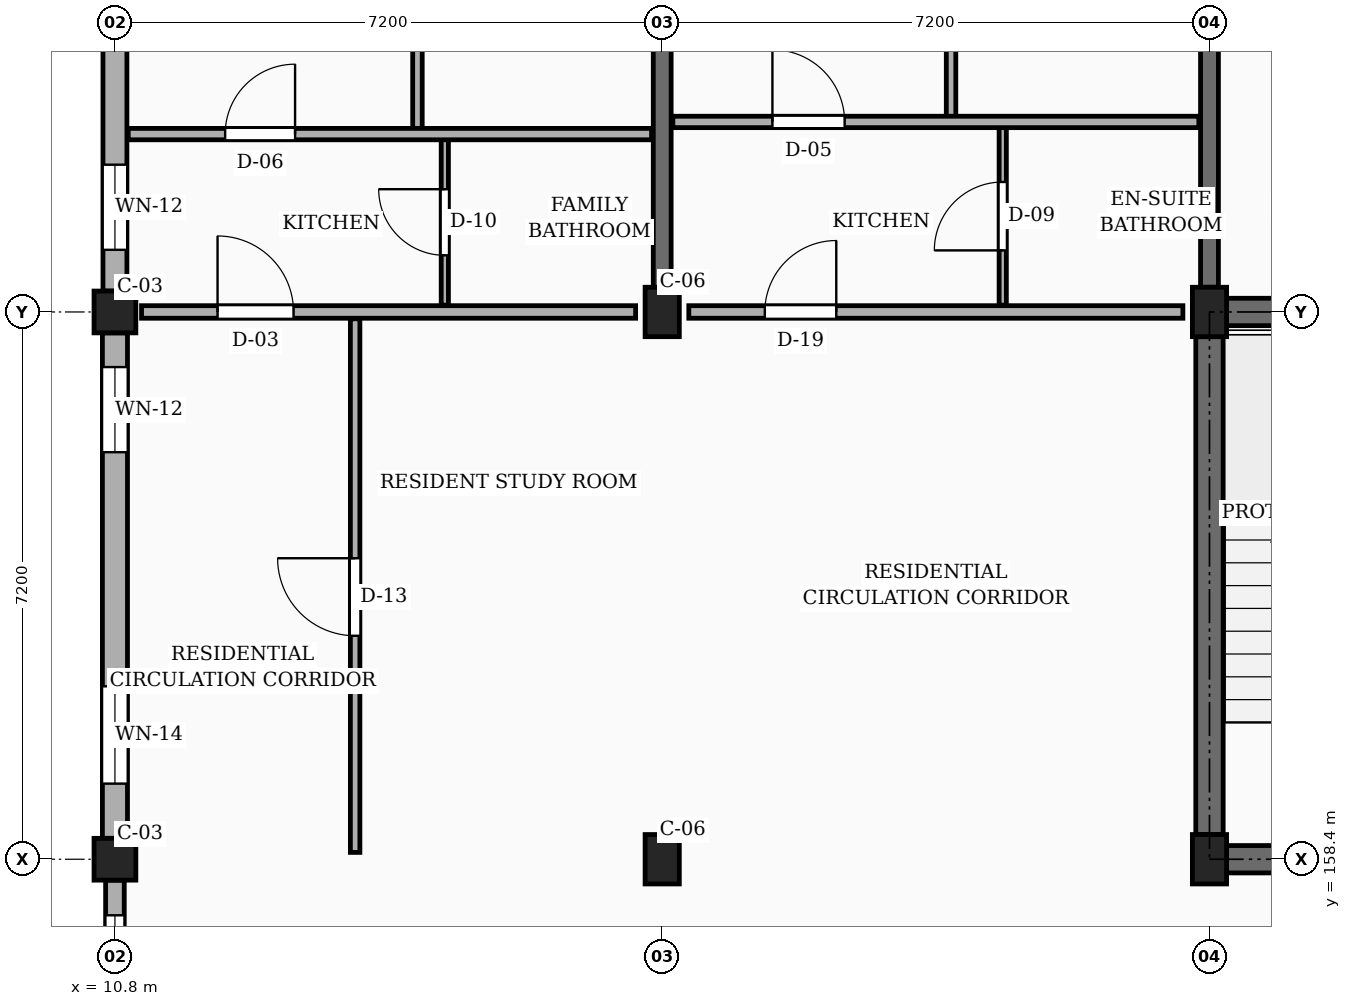
"""IFC4 building model, lengths in metres.
Left out: names, types, materials, properties, quantities, classifications, styles, units other than length and angle.
Written with IfcOpenShell. Run it as: python <this file> out.ifc"""

import sys

from ifc_helpers import new_model, si_unit, direction, frame, frame_2d, origin, origin_2d, place, context, subcontext, project, spatial, rectangle, extrude, element, fill, save


model = new_model("IFC4")
c1 = context("Model", 3, precision=1e-05, world=origin(), true_north=direction((0.0, 1.0)))
c2 = subcontext(c1, "Body", "Model", "MODEL_VIEW")
j1 = project(units=[si_unit("LENGTHUNIT", "METRE"), si_unit("PLANEANGLEUNIT", "RADIAN")], contexts=[c1])
p1 = place(None, origin())
s1 = spatial("IfcSite", under=j1, at=p1, CompositionType="ELEMENT")
p2 = place(p1, origin())
s2 = spatial("IfcBuilding", under=s1, at=p2, CompositionType="ELEMENT")
p3 = place(p2, frame((0.0, 0.0, 17.1)))
s3 = spatial("IfcBuildingStorey", under=s2, at=p3, CompositionType="ELEMENT", Elevation=17.1)
for number, where, z_axis, x_axis in (
    (1, (10.8, 158.4, 0.0), (0.0, 0.0, 1.0), (1.0, 0.0, 0.0)),
    (2, (10.8, 165.6, 0.0), (0.0, 0.0, 1.0), (1.0, 0.0, 0.0)),
):
    element("IfcColumn", number, at=place(p3, frame(where, z_axis=z_axis, x_axis=x_axis)), inside=s3, PredefinedType="COLUMN", context=c2, shape_type="SweptSolid", body=[
        extrude(rectangle(XDim=0.55, YDim=0.55, at=origin_2d()), origin(), (0.0, 0.0, 1.0), 3.15),
    ])
for number, where, z_axis, x_axis in (
    (3, (18.0, 158.4, 0.0), (0.0, 0.0, 1.0), (1.0, 0.0, 0.0)),
    (4, (18.0, 165.6, 0.0), (0.0, 0.0, 1.0), (1.0, 0.0, 0.0)),
    (5, (25.2, 158.4, 0.0), (0.0, 0.0, 1.0), (1.0, 0.0, 0.0)),
    (6, (25.2, 165.6, 0.0), (0.0, 0.0, 1.0), (1.0, 0.0, 0.0)),
):
    element("IfcColumn", number, at=place(p3, frame(where, z_axis=z_axis, x_axis=x_axis)), inside=s3, PredefinedType="COLUMN", context=c2, shape_type="SweptSolid", body=[
        extrude(rectangle(XDim=0.45, YDim=0.65, at=origin_2d()), origin(), (0.0, 0.0, 1.0), 3.15),
    ])
p4 = place(p3, frame((18.0, 165.925, 0.0), z_axis=(0.0, 0.0, 1.0), x_axis=(0.0, 1.0, 0.0)))
e7 = element("IfcWall", 7, at=p4, inside=s3, PredefinedType="SOLIDWALL", context=c2, shape_type="SweptSolid", body=[
    extrude(rectangle(XDim=6.6, YDim=0.235, at=frame_2d((3.3, 0.0))), origin(), (0.0, 0.0, 1.0), 2.185),
])
p5 = place(p3, frame((25.2, 165.925, 0.0), z_axis=(0.0, 0.0, 1.0), x_axis=(0.0, 1.0, 0.0)))
e8 = element("IfcWall", 8, at=p5, inside=s3, PredefinedType="SOLIDWALL", context=c2, shape_type="SweptSolid", body=[
    extrude(rectangle(XDim=6.6, YDim=0.235, at=frame_2d((3.3, 0.0))), origin(), (0.0, 0.0, 1.0), 2.185),
])
p6 = place(p5, frame((4.15, 0.0, 0.0)))
e9 = element("IfcOpeningElement", 9, at=p6, cuts=e8, PredefinedType="OPENING", context=c2, shape_type="SweptSolid", body=[
    extrude(rectangle(XDim=0.98, YDim=2.12, at=frame_2d((0.49, 1.06))), frame((0.0, 0.127, 0.0), z_axis=(0.0, -1.0, 0.0), x_axis=(1.0, 0.0, 0.0)), (0.0, 0.0, 1.0), 0.255),
])
p7 = place(p3, frame((10.8, 172.525, 0.0), z_axis=(0.0, 0.0, 1.0), x_axis=(0.0, -1.0, 0.0)))
e10 = element("IfcWall", 10, at=p7, inside=s3, PredefinedType="SOLIDWALL", context=c2, shape_type="SweptSolid", body=[
    extrude(rectangle(XDim=6.65, YDim=0.315, at=frame_2d((3.325, 0.0))), origin(), (0.0, 0.0, 1.0), 2.455),
])
p8 = place(p7, frame((1.883, 0.0, 0.78)))
e11 = element("IfcOpeningElement", 11, at=p8, cuts=e10, PredefinedType="OPENING", context=c2, shape_type="SweptSolid", body=[
    extrude(rectangle(XDim=0.96, YDim=1.26, at=frame_2d((0.48, 0.63))), frame((0.0, 0.167, 0.0), z_axis=(0.0, -1.0, 0.0), x_axis=(1.0, 0.0, 0.0)), (0.0, 0.0, 1.0), 0.335),
])
p9 = place(p7, frame((4.988, 0.0, 0.78)))
e12 = element("IfcOpeningElement", 12, at=p9, cuts=e10, PredefinedType="OPENING", context=c2, shape_type="SweptSolid", body=[
    extrude(rectangle(XDim=1.12, YDim=1.26, at=frame_2d((0.56, 0.63))), frame((0.0, 0.167, 0.0), z_axis=(0.0, -1.0, 0.0), x_axis=(1.0, 0.0, 0.0)), (0.0, 0.0, 1.0), 0.335),
])
p10 = place(p3, frame((10.8, 165.325, 0.0), z_axis=(0.0, 0.0, 1.0), x_axis=(0.0, -1.0, 0.0)))
e13 = element("IfcWall", 13, at=p10, inside=s3, PredefinedType="SOLIDWALL", context=c2, shape_type="SweptSolid", body=[
    extrude(rectangle(XDim=6.65, YDim=0.33, at=frame_2d((3.325, 0.0))), origin(), (0.0, 0.0, 1.0), 2.455),
])
p11 = place(p10, frame((0.45, 0.0, 0.78)))
e14 = element("IfcOpeningElement", 14, at=p11, cuts=e13, PredefinedType="OPENING", context=c2, shape_type="SweptSolid", body=[
    extrude(rectangle(XDim=1.12, YDim=1.26, at=frame_2d((0.56, 0.63))), frame((0.0, 0.175, 0.0), z_axis=(0.0, -1.0, 0.0), x_axis=(1.0, 0.0, 0.0)), (0.0, 0.0, 1.0), 0.35),
])
p12 = place(p10, frame((4.65, 0.0, 0.78)))
e15 = element("IfcOpeningElement", 15, at=p12, cuts=e13, PredefinedType="OPENING", context=c2, shape_type="SweptSolid", body=[
    extrude(rectangle(XDim=1.28, YDim=1.26, at=frame_2d((0.64, 0.63))), frame((0.0, 0.175, 0.0), z_axis=(0.0, -1.0, 0.0), x_axis=(1.0, 0.0, 0.0)), (0.0, 0.0, 1.0), 0.35),
])
p13 = place(p3, frame((10.8, 158.125, 0.0), z_axis=(0.0, 0.0, 1.0), x_axis=(0.0, -1.0, 0.0)))
e16 = element("IfcWall", 16, at=p13, inside=s3, PredefinedType="SOLIDWALL", context=c2, shape_type="SweptSolid", body=[
    extrude(rectangle(XDim=6.65, YDim=0.245, at=frame_2d((3.325, 0.0))), origin(), (0.0, 0.0, 1.0), 2.455),
])
p14 = place(p13, frame((0.462, 0.0, 0.78)))
e17 = element("IfcOpeningElement", 17, at=p14, cuts=e16, PredefinedType="OPENING", context=c2, shape_type="SweptSolid", body=[
    extrude(rectangle(XDim=1.04, YDim=1.26, at=frame_2d((0.52, 0.63))), frame((0.0, 0.133, 0.0), z_axis=(0.0, -1.0, 0.0), x_axis=(1.0, 0.0, 0.0)), (0.0, 0.0, 1.0), 0.265),
])
p15 = place(p13, frame((3.37, 0.0, 0.78)))
e18 = element("IfcOpeningElement", 18, at=p15, cuts=e16, PredefinedType="OPENING", context=c2, shape_type="SweptSolid", body=[
    extrude(rectangle(XDim=1.44, YDim=1.26, at=frame_2d((0.72, 0.63))), frame((0.0, 0.133, 0.0), z_axis=(0.0, -1.0, 0.0), x_axis=(1.0, 0.0, 0.0)), (0.0, 0.0, 1.0), 0.265),
])
p16 = place(p3, frame((25.2, 158.725, 0.0), z_axis=(0.0, 0.0, 1.0), x_axis=(0.0, 1.0, 0.0)))
e19 = element("IfcWall", 19, at=p16, inside=s3, PredefinedType="SHEAR", context=c2, shape_type="SweptSolid", body=[
    extrude(rectangle(XDim=6.55, YDim=0.36, at=frame_2d((3.275, 0.0))), origin(), (0.0, 0.0, 1.0), 2.885),
])
p17 = place(p3, frame((25.425, 165.6, 0.0), z_axis=(0.0, 0.0, 1.0), x_axis=(1.0, 0.0, 0.0)))
e20 = element("IfcWall", 20, at=p17, inside=s3, PredefinedType="SHEAR", context=c2, shape_type="SweptSolid", body=[
    extrude(rectangle(XDim=6.75, YDim=0.36, at=frame_2d((3.375, 0.0))), origin(), (0.0, 0.0, 1.0), 2.885),
])
p18 = place(p3, frame((25.425, 158.4, 0.0), z_axis=(0.0, 0.0, 1.0), x_axis=(1.0, 0.0, 0.0)))
e21 = element("IfcWall", 21, at=p18, inside=s3, PredefinedType="SHEAR", context=c2, shape_type="SweptSolid", body=[
    extrude(rectangle(XDim=6.75, YDim=0.36, at=frame_2d((3.375, 0.0))), origin(), (0.0, 0.0, 1.0), 2.885),
])
p19 = place(p18, frame((4.525, 0.0, 0.0)))
e22 = element("IfcOpeningElement", 22, at=p19, cuts=e21, PredefinedType="OPENING", context=c2, shape_type="SweptSolid", body=[
    extrude(rectangle(XDim=1.1, YDim=2.15, at=frame_2d((0.55, 1.075))), frame((0.0, 0.19, 0.0), z_axis=(0.0, -1.0, 0.0), x_axis=(1.0, 0.0, 0.0)), (0.0, 0.0, 1.0), 0.38),
])
p20 = place(p3, frame((11.15, 165.6, 0.0), z_axis=(0.0, 0.0, 1.0), x_axis=(1.0, 0.0, 0.0)))
e23 = element("IfcWall", 23, at=p20, inside=s3, PredefinedType="PARTITIONING", context=c2, shape_type="SweptSolid", body=[
    extrude(rectangle(XDim=6.5, YDim=0.165, at=frame_2d((3.25, 0.0))), origin(), (0.0, 0.0, 1.0), 2.235),
])
p21 = place(p20, frame((1.0, 0.0, 0.0)))
e24 = element("IfcOpeningElement", 24, at=p21, cuts=e23, PredefinedType="OPENING", context=c2, shape_type="SweptSolid", body=[
    extrude(rectangle(XDim=1.0, YDim=2.15, at=frame_2d((0.5, 1.075))), frame((0.0, 0.093, 0.0), z_axis=(0.0, -1.0, 0.0), x_axis=(1.0, 0.0, 0.0)), (0.0, 0.0, 1.0), 0.185),
])
p22 = place(p3, frame((18.35, 165.6, 0.0), z_axis=(0.0, 0.0, 1.0), x_axis=(1.0, 0.0, 0.0)))
e25 = element("IfcWall", 25, at=p22, inside=s3, PredefinedType="PARTITIONING", context=c2, shape_type="SweptSolid", body=[
    extrude(rectangle(XDim=6.5, YDim=0.165, at=frame_2d((3.25, 0.0))), origin(), (0.0, 0.0, 1.0), 2.235),
])
p23 = place(p22, frame((1.0, 0.0, 0.0)))
e26 = element("IfcOpeningElement", 26, at=p23, cuts=e25, PredefinedType="OPENING", context=c2, shape_type="SweptSolid", body=[
    extrude(rectangle(XDim=0.94, YDim=2.12, at=frame_2d((0.47, 1.06))), frame((0.0, 0.093, 0.0), z_axis=(0.0, -1.0, 0.0), x_axis=(1.0, 0.0, 0.0)), (0.0, 0.0, 1.0), 0.185),
])
p24 = place(p3, frame((13.96, 158.49, 0.0), z_axis=(0.0, 0.0, 1.0), x_axis=(0.0, 1.0, 0.0)))
e27 = element("IfcWall", 27, at=p24, inside=s3, PredefinedType="PARTITIONING", context=c2, shape_type="SweptSolid", body=[
    extrude(rectangle(XDim=7.02, YDim=0.125, at=frame_2d((3.51, 0.0))), origin(), (0.0, 0.0, 1.0), 2.32),
])
p25 = place(p24, frame((2.85, 0.0, 0.0)))
e28 = element("IfcOpeningElement", 28, at=p25, cuts=e27, PredefinedType="OPENING", context=c2, shape_type="SweptSolid", body=[
    extrude(rectangle(XDim=1.02, YDim=2.15, at=frame_2d((0.51, 1.075))), frame((0.0, 0.073, 0.0), z_axis=(0.0, -1.0, 0.0), x_axis=(1.0, 0.0, 0.0)), (0.0, 0.0, 1.0), 0.145),
])
p26 = place(p3, frame((14.78, 168.01, 0.0), z_axis=(0.0, 0.0, 1.0), x_axis=(0.0, 1.0, 0.0)))
e29 = element("IfcWall", 29, at=p26, inside=s3, PredefinedType="PARTITIONING", context=c2, shape_type="SweptSolid", body=[
    extrude(rectangle(XDim=4.615, YDim=0.125, at=frame_2d((2.308, 0.0))), origin(), (0.0, 0.0, 1.0), 2.32),
])
p27 = place(p26, frame((1.867, 0.0, 0.0)))
e30 = element("IfcOpeningElement", 30, at=p27, cuts=e29, PredefinedType="OPENING", context=c2, shape_type="SweptSolid", body=[
    extrude(rectangle(XDim=0.88, YDim=2.08, at=frame_2d((0.44, 1.04))), frame((0.0, 0.073, 0.0), z_axis=(0.0, -1.0, 0.0), x_axis=(1.0, 0.0, 0.0)), (0.0, 0.0, 1.0), 0.145),
])
p28 = place(p3, frame((15.14, 165.69, 0.0), z_axis=(0.0, 0.0, 1.0), x_axis=(0.0, 1.0, 0.0)))
e31 = element("IfcWall", 31, at=p28, inside=s3, PredefinedType="PARTITIONING", context=c2, shape_type="SweptSolid", body=[
    extrude(rectangle(XDim=2.18, YDim=0.095, at=frame_2d((1.09, 0.0))), origin(), (0.0, 0.0, 1.0), 2.32),
])
p29 = place(p28, frame((0.655, 0.0, 0.0)))
e32 = element("IfcOpeningElement", 32, at=p29, cuts=e31, PredefinedType="OPENING", context=c2, shape_type="SweptSolid", body=[
    extrude(rectangle(XDim=0.87, YDim=2.05, at=frame_2d((0.435, 1.025))), frame((0.0, 0.058, 0.0), z_axis=(0.0, -1.0, 0.0), x_axis=(1.0, 0.0, 0.0)), (0.0, 0.0, 1.0), 0.115),
])
p30 = place(p3, frame((10.975, 167.94, 0.0), z_axis=(0.0, 0.0, 1.0), x_axis=(1.0, 0.0, 0.0)))
e33 = element("IfcWall", 33, at=p30, inside=s3, PredefinedType="PARTITIONING", context=c2, shape_type="SweptSolid", body=[
    extrude(rectangle(XDim=6.885, YDim=0.15, at=frame_2d((3.442, 0.0))), origin(), (0.0, 0.0, 1.0), 2.32),
])
p31 = place(p30, frame((1.275, 0.0, 0.0)))
e34 = element("IfcOpeningElement", 34, at=p31, cuts=e33, PredefinedType="OPENING", context=c2, shape_type="SweptSolid", body=[
    extrude(rectangle(XDim=0.92, YDim=2.1, at=frame_2d((0.46, 1.05))), frame((0.0, 0.085, 0.0), z_axis=(0.0, -1.0, 0.0), x_axis=(1.0, 0.0, 0.0)), (0.0, 0.0, 1.0), 0.17),
])
p32 = place(p3, frame((21.8, 168.17, 0.0), z_axis=(0.0, 0.0, 1.0), x_axis=(0.0, 1.0, 0.0)))
e35 = element("IfcWall", 35, at=p32, inside=s3, PredefinedType="PARTITIONING", context=c2, shape_type="SweptSolid", body=[
    extrude(rectangle(XDim=4.455, YDim=0.125, at=frame_2d((2.228, 0.0))), origin(), (0.0, 0.0, 1.0), 2.32),
])
p33 = place(p32, frame((1.778, 0.0, 0.0)))
e36 = element("IfcOpeningElement", 36, at=p33, cuts=e35, PredefinedType="OPENING", context=c2, shape_type="SweptSolid", body=[
    extrude(rectangle(XDim=0.9, YDim=2.1, at=frame_2d((0.45, 1.05))), frame((0.0, 0.073, 0.0), z_axis=(0.0, -1.0, 0.0), x_axis=(1.0, 0.0, 0.0)), (0.0, 0.0, 1.0), 0.145),
])
p34 = place(p3, frame((22.48, 165.69, 0.0), z_axis=(0.0, 0.0, 1.0), x_axis=(0.0, 1.0, 0.0)))
e37 = element("IfcWall", 37, at=p34, inside=s3, PredefinedType="PARTITIONING", context=c2, shape_type="SweptSolid", body=[
    extrude(rectangle(XDim=2.34, YDim=0.095, at=frame_2d((1.17, 0.0))), origin(), (0.0, 0.0, 1.0), 2.32),
])
p35 = place(p34, frame((0.72, 0.0, 0.0)))
e38 = element("IfcOpeningElement", 38, at=p35, cuts=e37, PredefinedType="OPENING", context=c2, shape_type="SweptSolid", body=[
    extrude(rectangle(XDim=0.9, YDim=2.05, at=frame_2d((0.45, 1.025))), frame((0.0, 0.058, 0.0), z_axis=(0.0, -1.0, 0.0), x_axis=(1.0, 0.0, 0.0)), (0.0, 0.0, 1.0), 0.115),
])
p36 = place(p3, frame((18.14, 168.1, 0.0), z_axis=(0.0, 0.0, 1.0), x_axis=(1.0, 0.0, 0.0)))
e39 = element("IfcWall", 39, at=p36, inside=s3, PredefinedType="PARTITIONING", context=c2, shape_type="SweptSolid", body=[
    extrude(rectangle(XDim=6.92, YDim=0.15, at=frame_2d((3.46, 0.0))), origin(), (0.0, 0.0, 1.0), 2.32),
])
p37 = place(p36, frame((1.31, 0.0, 0.0)))
e40 = element("IfcOpeningElement", 40, at=p37, cuts=e39, PredefinedType="OPENING", context=c2, shape_type="SweptSolid", body=[
    extrude(rectangle(XDim=0.95, YDim=2.1, at=frame_2d((0.475, 1.05))), frame((0.0, 0.085, 0.0), z_axis=(0.0, -1.0, 0.0), x_axis=(1.0, 0.0, 0.0)), (0.0, 0.0, 1.0), 0.17),
])
p38 = place(p9, origin())
e41 = element("IfcWindow", 41, at=p38, inside=s3, PartitioningType="SINGLE_PANEL", PredefinedType="WINDOW", context=c2, shape_type="SweptSolid", body=[
    extrude(rectangle(XDim=1.12, YDim=1.26, at=frame_2d((0.56, 0.63))), frame((0.0, 0.03, 0.0), z_axis=(0.0, -1.0, 0.0), x_axis=(1.0, 0.0, 0.0)), (0.0, 0.0, 1.0), 0.06),
])
fill(e12, e41)
p39 = place(p11, origin())
e42 = element("IfcWindow", 42, at=p39, inside=s3, PartitioningType="SINGLE_PANEL", PredefinedType="WINDOW", context=c2, shape_type="SweptSolid", body=[
    extrude(rectangle(XDim=1.12, YDim=1.26, at=frame_2d((0.56, 0.63))), frame((0.0, 0.03, 0.0), z_axis=(0.0, -1.0, 0.0), x_axis=(1.0, 0.0, 0.0)), (0.0, 0.0, 1.0), 0.06),
])
fill(e14, e42)
p40 = place(p12, origin())
e43 = element("IfcWindow", 43, at=p40, inside=s3, PartitioningType="SINGLE_PANEL", PredefinedType="WINDOW", context=c2, shape_type="SweptSolid", body=[
    extrude(rectangle(XDim=1.28, YDim=1.26, at=frame_2d((0.64, 0.63))), frame((0.0, 0.03, 0.0), z_axis=(0.0, -1.0, 0.0), x_axis=(1.0, 0.0, 0.0)), (0.0, 0.0, 1.0), 0.06),
])
fill(e15, e43)
p41 = place(p14, origin())
e44 = element("IfcWindow", 44, at=p41, inside=s3, PartitioningType="SINGLE_PANEL", PredefinedType="WINDOW", context=c2, shape_type="SweptSolid", body=[
    extrude(rectangle(XDim=1.04, YDim=1.26, at=frame_2d((0.52, 0.63))), frame((0.0, 0.03, 0.0), z_axis=(0.0, -1.0, 0.0), x_axis=(1.0, 0.0, 0.0)), (0.0, 0.0, 1.0), 0.06),
])
fill(e17, e44)
p42 = place(p21, origin())
e45 = element("IfcDoor", 45, at=p42, inside=s3, OperationType="SINGLE_SWING_LEFT", PredefinedType="DOOR", context=c2, shape_type="SweptSolid", body=[
    extrude(rectangle(XDim=1.0, YDim=2.15, at=frame_2d((0.5, 1.075))), frame((0.0, 0.025, 0.0), z_axis=(0.0, -1.0, 0.0), x_axis=(1.0, 0.0, 0.0)), (0.0, 0.0, 1.0), 0.05),
])
fill(e24, e45)
p43 = place(p23, origin())
e46 = element("IfcDoor", 46, at=p43, inside=s3, OperationType="SINGLE_SWING_RIGHT", PredefinedType="DOOR", context=c2, shape_type="SweptSolid", body=[
    extrude(rectangle(XDim=0.94, YDim=2.12, at=frame_2d((0.47, 1.06))), frame((0.0, 0.025, 0.0), z_axis=(0.0, -1.0, 0.0), x_axis=(1.0, 0.0, 0.0)), (0.0, 0.0, 1.0), 0.05),
])
fill(e26, e46)
p44 = place(p25, origin())
e47 = element("IfcDoor", 47, at=p44, inside=s3, OperationType="SINGLE_SWING_RIGHT", PredefinedType="DOOR", context=c2, shape_type="SweptSolid", body=[
    extrude(rectangle(XDim=1.02, YDim=2.15, at=frame_2d((0.51, 1.075))), frame((0.0, 0.025, 0.0), z_axis=(0.0, -1.0, 0.0), x_axis=(1.0, 0.0, 0.0)), (0.0, 0.0, 1.0), 0.05),
])
fill(e28, e47)
p45 = place(p29, origin())
e48 = element("IfcDoor", 48, at=p45, inside=s3, OperationType="SINGLE_SWING_RIGHT", PredefinedType="DOOR", context=c2, shape_type="SweptSolid", body=[
    extrude(rectangle(XDim=0.87, YDim=2.05, at=frame_2d((0.435, 1.025))), frame((0.0, 0.025, 0.0), z_axis=(0.0, -1.0, 0.0), x_axis=(1.0, 0.0, 0.0)), (0.0, 0.0, 1.0), 0.05),
])
fill(e32, e48)
p46 = place(p31, origin())
e49 = element("IfcDoor", 49, at=p46, inside=s3, OperationType="SINGLE_SWING_RIGHT", PredefinedType="DOOR", context=c2, shape_type="SweptSolid", body=[
    extrude(rectangle(XDim=0.92, YDim=2.1, at=frame_2d((0.46, 1.05))), frame((0.0, 0.025, 0.0), z_axis=(0.0, -1.0, 0.0), x_axis=(1.0, 0.0, 0.0)), (0.0, 0.0, 1.0), 0.05),
])
fill(e34, e49)
p47 = place(p35, origin())
e50 = element("IfcDoor", 50, at=p47, inside=s3, OperationType="SINGLE_SWING_LEFT", PredefinedType="DOOR", context=c2, shape_type="SweptSolid", body=[
    extrude(rectangle(XDim=0.9, YDim=2.05, at=frame_2d((0.45, 1.025))), frame((0.0, 0.025, 0.0), z_axis=(0.0, -1.0, 0.0), x_axis=(1.0, 0.0, 0.0)), (0.0, 0.0, 1.0), 0.05),
])
fill(e38, e50)
p48 = place(p37, origin())
e51 = element("IfcDoor", 51, at=p48, inside=s3, OperationType="SINGLE_SWING_LEFT", PredefinedType="DOOR", context=c2, shape_type="SweptSolid", body=[
    extrude(rectangle(XDim=0.95, YDim=2.1, at=frame_2d((0.475, 1.05))), frame((0.0, 0.025, 0.0), z_axis=(0.0, -1.0, 0.0), x_axis=(1.0, 0.0, 0.0)), (0.0, 0.0, 1.0), 0.05),
])
fill(e40, e51)
save(model, sys.argv[1])
